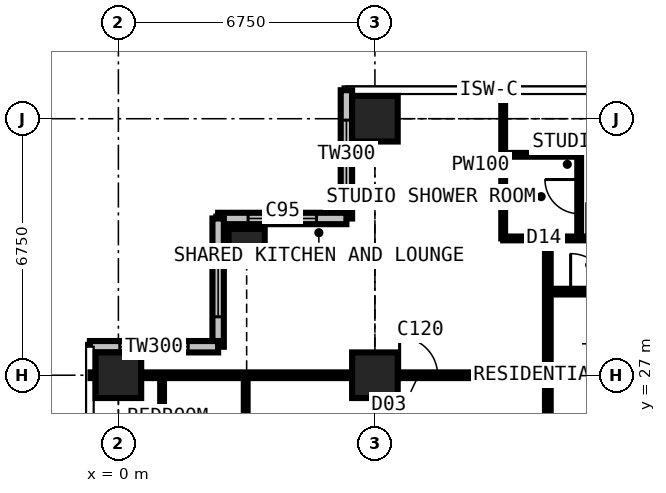
"""IFC4 building model, lengths in metres.
Left out: names, types, materials, properties, quantities, classifications, styles, units other than length and angle.
Written with IfcOpenShell. Run it as: python <this file> out.ifc"""

import sys

from ifc_helpers import new_model, si_unit, direction, frame, frame_2d, origin, origin_2d, place, context, subcontext, project, spatial, rectangle, extrude, element, fill, save


model = new_model("IFC4")
c1 = context("Model", 3, precision=1e-05, world=origin(), true_north=direction((0.0, 1.0)))
c2 = subcontext(c1, "Body", "Model", "MODEL_VIEW")
j1 = project(units=[si_unit("LENGTHUNIT", "METRE"), si_unit("PLANEANGLEUNIT", "RADIAN")], contexts=[c1])
p1 = place(None, origin())
s1 = spatial("IfcSite", under=j1, at=p1, CompositionType="ELEMENT")
p2 = place(p1, origin())
s2 = spatial("IfcBuilding", under=s1, at=p2, CompositionType="ELEMENT")
p3 = place(p2, frame((0.0, 0.0, 178.2)))
s3 = spatial("IfcBuildingStorey", under=s2, at=p3, CompositionType="ELEMENT", Elevation=178.2)
p4 = place(p3, frame((0.0, 27.0, 0.0), z_axis=(0.0, 0.0, 1.0), x_axis=(1.0, 0.0, 0.0)))
e1 = element("IfcColumn", 1, at=p4, inside=s3, PredefinedType="COLUMN", context=c2, shape_type="SweptSolid", body=[
    extrude(rectangle(XDim=1.2, YDim=1.2, at=origin_2d()), origin(), (0.0, 0.0, 1.0), 3.6),
])
p5 = place(p3, frame((3.375, 30.375, 0.0), z_axis=(0.0, 0.0, 1.0), x_axis=(1.0, 0.0, 0.0)))
e2 = element("IfcColumn", 2, at=p5, inside=s3, PredefinedType="COLUMN", context=c2, shape_type="SweptSolid", body=[
    extrude(rectangle(XDim=0.95, YDim=0.95, at=origin_2d()), origin(), (0.0, 0.0, 1.0), 3.6),
])
for number, where, z_axis, x_axis in (
    (3, (6.75, 27.0, 0.0), (0.0, 0.0, 1.0), (1.0, 0.0, 0.0)),
    (4, (6.75, 33.75, 0.0), (0.0, 0.0, 1.0), (1.0, 0.0, 0.0)),
):
    element("IfcColumn", number, at=place(p3, frame(where, z_axis=z_axis, x_axis=x_axis)), inside=s3, PredefinedType="COLUMN", context=c2, shape_type="SweptSolid", body=[
        extrude(rectangle(XDim=1.2, YDim=1.2, at=origin_2d()), origin(), (0.0, 0.0, 1.0), 3.6),
    ])
p6 = place(p3, frame((6.0, 34.5, 0.0), z_axis=(0.0, 0.0, 1.0), x_axis=(0.0, -1.0, 0.0)))
e5 = element("IfcWall", 5, at=p6, inside=s3, PredefinedType="SOLIDWALL", context=c2, shape_type="SweptSolid", body=[
    extrude(rectangle(XDim=3.375, YDim=0.3, at=frame_2d((1.688, 0.0))), origin(), (0.0, 0.0, 1.0), 3.375),
])
p7 = place(p6, frame((0.788, 0.0, 0.6)))
e6 = element("IfcOpeningElement", 6, at=p7, cuts=e5, PredefinedType="OPENING", context=c2, shape_type="SweptSolid", body=[
    extrude(rectangle(XDim=1.8, YDim=2.1, at=frame_2d((0.9, 1.05))), frame((0.0, 0.16, 0.0), z_axis=(0.0, -1.0, 0.0), x_axis=(1.0, 0.0, 0.0)), (0.0, 0.0, 1.0), 0.32),
])
p8 = place(p3, frame((6.0, 31.125, 0.0), z_axis=(0.0, 0.0, 1.0), x_axis=(-1.0, 0.0, 0.0)))
e7 = element("IfcWall", 7, at=p8, inside=s3, PredefinedType="SOLIDWALL", context=c2, shape_type="SweptSolid", body=[
    extrude(rectangle(XDim=3.375, YDim=0.3, at=frame_2d((1.688, 0.0))), origin(), (0.0, 0.0, 1.0), 3.375),
])
p9 = place(p8, frame((0.788, 0.0, 0.6)))
e8 = element("IfcOpeningElement", 8, at=p9, cuts=e7, PredefinedType="OPENING", context=c2, shape_type="SweptSolid", body=[
    extrude(rectangle(XDim=1.8, YDim=2.1, at=frame_2d((0.9, 1.05))), frame((0.0, 0.16, 0.0), z_axis=(0.0, -1.0, 0.0), x_axis=(1.0, 0.0, 0.0)), (0.0, 0.0, 1.0), 0.32),
])
p10 = place(p3, frame((2.625, 31.125, 0.0), z_axis=(0.0, 0.0, 1.0), x_axis=(0.0, -1.0, 0.0)))
e9 = element("IfcWall", 9, at=p10, inside=s3, PredefinedType="SOLIDWALL", context=c2, shape_type="SweptSolid", body=[
    extrude(rectangle(XDim=3.375, YDim=0.3, at=frame_2d((1.688, 0.0))), origin(), (0.0, 0.0, 1.0), 3.375),
])
p11 = place(p10, frame((0.788, 0.0, 0.6)))
e10 = element("IfcOpeningElement", 10, at=p11, cuts=e9, PredefinedType="OPENING", context=c2, shape_type="SweptSolid", body=[
    extrude(rectangle(XDim=1.8, YDim=2.1, at=frame_2d((0.9, 1.05))), frame((0.0, 0.16, 0.0), z_axis=(0.0, -1.0, 0.0), x_axis=(1.0, 0.0, 0.0)), (0.0, 0.0, 1.0), 0.32),
])
p12 = place(p3, frame((2.625, 27.75, 0.0), z_axis=(0.0, 0.0, 1.0), x_axis=(-1.0, 0.0, 0.0)))
e11 = element("IfcWall", 11, at=p12, inside=s3, PredefinedType="SOLIDWALL", context=c2, shape_type="SweptSolid", body=[
    extrude(rectangle(XDim=3.375, YDim=0.3, at=frame_2d((1.688, 0.0))), origin(), (0.0, 0.0, 1.0), 3.375),
])
p13 = place(p12, frame((0.788, 0.0, 0.6)))
e12 = element("IfcOpeningElement", 12, at=p13, cuts=e11, PredefinedType="OPENING", context=c2, shape_type="SweptSolid", body=[
    extrude(rectangle(XDim=1.8, YDim=2.1, at=frame_2d((0.9, 1.05))), frame((0.0, 0.16, 0.0), z_axis=(0.0, -1.0, 0.0), x_axis=(1.0, 0.0, 0.0)), (0.0, 0.0, 1.0), 0.32),
])
p14 = place(p3, frame((-0.734, 27.0, 0.0), z_axis=(0.0, 0.0, 1.0), x_axis=(1.0, 0.0, 0.0)))
e13 = element("IfcWall", 13, at=p14, inside=s3, PredefinedType="PARTITIONING", context=c2, shape_type="SweptSolid", body=[
    extrude(rectangle(XDim=12.034, YDim=0.15, at=frame_2d((6.017, 0.0))), origin(), (0.0, 0.0, 1.0), 2.806),
])
p15 = place(p14, frame((8.134, 0.0, 0.0)))
e14 = element("IfcOpeningElement", 14, at=p15, cuts=e13, PredefinedType="OPENING", context=c2, shape_type="SweptSolid", body=[
    extrude(rectangle(XDim=1.0, YDim=2.2, at=frame_2d((0.5, 1.1))), frame((0.0, 0.085, 0.0), z_axis=(0.0, -1.0, 0.0), x_axis=(1.0, 0.0, 0.0)), (0.0, 0.0, 1.0), 0.17),
])
p16 = place(p3, frame((1.15, 25.0, 0.0), z_axis=(0.0, 0.0, 1.0), x_axis=(0.0, 1.0, 0.0)))
e15 = element("IfcWall", 15, at=p16, inside=s3, PredefinedType="PARTITIONING", context=c2, shape_type="SweptSolid", body=[
    extrude(rectangle(XDim=2.0, YDim=0.1, at=frame_2d((1.0, 0.0))), origin(), (0.0, 0.0, 1.0), 3.375),
])
p17 = place(p3, frame((3.35, 10.125, 0.0), z_axis=(0.0, 0.0, 1.0), x_axis=(0.0, 1.0, 0.0)))
e16 = element("IfcWall", 16, at=p17, inside=s3, PredefinedType="PARTITIONING", context=c2, shape_type="SweptSolid", body=[
    extrude(rectangle(XDim=16.875, YDim=0.1, at=frame_2d((8.438, 0.0))), origin(), (0.0, 0.0, 1.0), 3.375),
])
p18 = place(p17, frame((13.7, 0.0, 0.0)))
e17 = element("IfcOpeningElement", 17, at=p18, cuts=e16, PredefinedType="OPENING", context=c2, shape_type="SweptSolid", body=[
    extrude(rectangle(XDim=0.95, YDim=2.2, at=frame_2d((0.475, 1.1))), frame((0.0, 0.06, 0.0), z_axis=(0.0, -1.0, 0.0), x_axis=(1.0, 0.0, 0.0)), (0.0, 0.0, 1.0), 0.12),
])
p19 = place(p17, frame((4.2, 0.0, 0.0)))
e18 = element("IfcOpeningElement", 18, at=p19, cuts=e16, PredefinedType="OPENING", context=c2, shape_type="SweptSolid", body=[
    extrude(rectangle(XDim=0.95, YDim=2.2, at=frame_2d((0.475, 1.1))), frame((0.0, 0.06, 0.0), z_axis=(0.0, -1.0, 0.0), x_axis=(1.0, 0.0, 0.0)), (0.0, 0.0, 1.0), 0.12),
])
p20 = place(p17, frame((10.95, 0.0, 0.0)))
e19 = element("IfcOpeningElement", 19, at=p20, cuts=e16, PredefinedType="OPENING", context=c2, shape_type="SweptSolid", body=[
    extrude(rectangle(XDim=0.95, YDim=2.2, at=frame_2d((0.475, 1.1))), frame((0.0, 0.06, 0.0), z_axis=(0.0, -1.0, 0.0), x_axis=(1.0, 0.0, 0.0)), (0.0, 0.0, 1.0), 0.12),
])
p21 = place(p3, frame((10.125, 30.6, 0.0), z_axis=(0.0, 0.0, 1.0), x_axis=(0.0, 1.0, 0.0)))
e20 = element("IfcWall", 20, at=p21, inside=s3, PredefinedType="PARTITIONING", context=c2, shape_type="SweptSolid", body=[
    extrude(rectangle(XDim=3.884, YDim=0.1, at=frame_2d((1.942, 0.0))), origin(), (0.0, 0.0, 1.0), 3.375),
])
p22 = place(p3, frame((10.125, 30.6, 0.0), z_axis=(0.0, 0.0, 1.0), x_axis=(1.0, 0.0, 0.0)))
e21 = element("IfcWall", 21, at=p22, inside=s3, PredefinedType="PARTITIONING", context=c2, shape_type="SweptSolid", body=[
    extrude(rectangle(XDim=3.375, YDim=0.1, at=frame_2d((1.688, 0.0))), origin(), (0.0, 0.0, 1.0), 3.375),
])
p23 = place(p22, frame((2.2, 0.0, 0.0)))
e22 = element("IfcOpeningElement", 22, at=p23, cuts=e21, PredefinedType="OPENING", context=c2, shape_type="SweptSolid", body=[
    extrude(rectangle(XDim=0.95, YDim=2.2, at=frame_2d((0.475, 1.1))), frame((0.0, 0.06, 0.0), z_axis=(0.0, -1.0, 0.0), x_axis=(1.0, 0.0, 0.0)), (0.0, 0.0, 1.0), 0.12),
])
p24 = place(p3, frame((10.125, 32.8, 0.0), z_axis=(0.0, 0.0, 1.0), x_axis=(1.0, 0.0, 0.0)))
e23 = element("IfcWall", 23, at=p24, inside=s3, PredefinedType="PARTITIONING", context=c2, shape_type="SweptSolid", body=[
    extrude(rectangle(XDim=2.0, YDim=0.1, at=frame_2d((1.0, 0.0))), origin(), (0.0, 0.0, 1.0), 3.375),
])
p25 = place(p3, frame((11.3, 11.3, 0.0), z_axis=(0.0, 0.0, 1.0), x_axis=(0.0, 1.0, 0.0)))
e24 = element("IfcWall", 24, at=p25, inside=s3, PredefinedType="PARTITIONING", context=c2, shape_type="SweptSolid", body=[
    extrude(rectangle(XDim=19.3, YDim=0.15, at=frame_2d((9.65, 0.0))), origin(), (0.0, 0.0, 1.0), 3.375),
])
p26 = place(p25, frame((13.525, 0.0, 0.0)))
e25 = element("IfcOpeningElement", 25, at=p26, cuts=e24, PredefinedType="OPENING", context=c2, shape_type="SweptSolid", body=[
    extrude(rectangle(XDim=1.0, YDim=2.2, at=frame_2d((0.5, 1.1))), frame((0.0, 0.085, 0.0), z_axis=(0.0, -1.0, 0.0), x_axis=(1.0, 0.0, 0.0)), (0.0, 0.0, 1.0), 0.17),
])
p27 = place(p25, frame((10.438, 0.0, 0.0)))
e26 = element("IfcOpeningElement", 26, at=p27, cuts=e24, PredefinedType="OPENING", context=c2, shape_type="SweptSolid", body=[
    extrude(rectangle(XDim=1.0, YDim=2.2, at=frame_2d((0.5, 1.1))), frame((0.0, 0.085, 0.0), z_axis=(0.0, -1.0, 0.0), x_axis=(1.0, 0.0, 0.0)), (0.0, 0.0, 1.0), 0.17),
])
p28 = place(p3, frame((11.3, 29.2, 0.0), z_axis=(0.0, 0.0, 1.0), x_axis=(1.0, 0.0, 0.0)))
e27 = element("IfcWall", 27, at=p28, inside=s3, PredefinedType="PARTITIONING", context=c2, shape_type="SweptSolid", body=[
    extrude(rectangle(XDim=19.809, YDim=0.15, at=frame_2d((9.904, 0.0))), origin(), (0.0, 0.0, 1.0), 3.375),
])
p29 = place(p28, frame((12.9, 0.0, 0.0)))
e28 = element("IfcOpeningElement", 28, at=p29, cuts=e27, PredefinedType="OPENING", context=c2, shape_type="SweptSolid", body=[
    extrude(rectangle(XDim=1.0, YDim=2.2, at=frame_2d((0.5, 1.1))), frame((0.0, 0.085, 0.0), z_axis=(0.0, -1.0, 0.0), x_axis=(1.0, 0.0, 0.0)), (0.0, 0.0, 1.0), 0.17),
])
p30 = place(p28, frame((5.825, 0.0, 0.0)))
e29 = element("IfcOpeningElement", 29, at=p30, cuts=e27, PredefinedType="OPENING", context=c2, shape_type="SweptSolid", body=[
    extrude(rectangle(XDim=0.95, YDim=2.2, at=frame_2d((0.475, 1.1))), frame((0.0, 0.085, 0.0), z_axis=(0.0, -1.0, 0.0), x_axis=(1.0, 0.0, 0.0)), (0.0, 0.0, 1.0), 0.17),
])
p31 = place(p28, frame((0.6, 0.0, 0.0)))
e30 = element("IfcOpeningElement", 30, at=p31, cuts=e27, PredefinedType="OPENING", context=c2, shape_type="SweptSolid", body=[
    extrude(rectangle(XDim=1.0, YDim=2.2, at=frame_2d((0.5, 1.1))), frame((0.0, 0.085, 0.0), z_axis=(0.0, -1.0, 0.0), x_axis=(1.0, 0.0, 0.0)), (0.0, 0.0, 1.0), 0.17),
])
p32 = place(p3, frame((12.125, 30.6, 0.0), z_axis=(0.0, 0.0, 1.0), x_axis=(0.0, 1.0, 0.0)))
e31 = element("IfcWall", 31, at=p32, inside=s3, PredefinedType="PARTITIONING", context=c2, shape_type="SweptSolid", body=[
    extrude(rectangle(XDim=2.2, YDim=0.1, at=frame_2d((1.1, 0.0))), origin(), (0.0, 0.0, 1.0), 3.375),
])
p33 = place(p32, frame((0.65, 0.0, 0.0)))
e32 = element("IfcOpeningElement", 32, at=p33, cuts=e31, PredefinedType="OPENING", context=c2, shape_type="SweptSolid", body=[
    extrude(rectangle(XDim=0.9, YDim=2.2, at=frame_2d((0.45, 1.1))), frame((0.0, 0.06, 0.0), z_axis=(0.0, -1.0, 0.0), x_axis=(1.0, 0.0, 0.0)), (0.0, 0.0, 1.0), 0.12),
])
p34 = place(p7, origin())
e33 = element("IfcWindow", 33, at=p34, inside=s3, PartitioningType="SINGLE_PANEL", PredefinedType="WINDOW", context=c2, shape_type="SweptSolid", body=[
    extrude(rectangle(XDim=1.8, YDim=2.1, at=frame_2d((0.9, 1.05))), frame((0.0, 0.03, 0.0), z_axis=(0.0, -1.0, 0.0), x_axis=(1.0, 0.0, 0.0)), (0.0, 0.0, 1.0), 0.06),
])
fill(e6, e33)
p35 = place(p9, origin())
e34 = element("IfcWindow", 34, at=p35, inside=s3, PartitioningType="SINGLE_PANEL", PredefinedType="WINDOW", context=c2, shape_type="SweptSolid", body=[
    extrude(rectangle(XDim=1.8, YDim=2.1, at=frame_2d((0.9, 1.05))), frame((0.0, 0.03, 0.0), z_axis=(0.0, -1.0, 0.0), x_axis=(1.0, 0.0, 0.0)), (0.0, 0.0, 1.0), 0.06),
])
fill(e8, e34)
p36 = place(p11, origin())
e35 = element("IfcWindow", 35, at=p36, inside=s3, PartitioningType="SINGLE_PANEL", PredefinedType="WINDOW", context=c2, shape_type="SweptSolid", body=[
    extrude(rectangle(XDim=1.8, YDim=2.1, at=frame_2d((0.9, 1.05))), frame((0.0, 0.03, 0.0), z_axis=(0.0, -1.0, 0.0), x_axis=(1.0, 0.0, 0.0)), (0.0, 0.0, 1.0), 0.06),
])
fill(e10, e35)
p37 = place(p13, origin())
e36 = element("IfcWindow", 36, at=p37, inside=s3, PartitioningType="SINGLE_PANEL", PredefinedType="WINDOW", context=c2, shape_type="SweptSolid", body=[
    extrude(rectangle(XDim=1.8, YDim=2.1, at=frame_2d((0.9, 1.05))), frame((0.0, 0.03, 0.0), z_axis=(0.0, -1.0, 0.0), x_axis=(1.0, 0.0, 0.0)), (0.0, 0.0, 1.0), 0.06),
])
fill(e12, e36)
p38 = place(p33, origin())
e37 = element("IfcDoor", 37, at=p38, inside=s3, OperationType="SINGLE_SWING_RIGHT", PredefinedType="DOOR", context=c2, shape_type="SweptSolid", body=[
    extrude(rectangle(XDim=0.9, YDim=2.2, at=frame_2d((0.45, 1.1))), frame((0.0, 0.025, 0.0), z_axis=(0.0, -1.0, 0.0), x_axis=(1.0, 0.0, 0.0)), (0.0, 0.0, 1.0), 0.05),
])
fill(e32, e37)
p39 = place(p31, origin())
e38 = element("IfcDoor", 38, at=p39, inside=s3, OperationType="SINGLE_SWING_LEFT", PredefinedType="DOOR", context=c2, shape_type="SweptSolid", body=[
    extrude(rectangle(XDim=1.0, YDim=2.2, at=frame_2d((0.5, 1.1))), frame((0.0, 0.025, 0.0), z_axis=(0.0, -1.0, 0.0), x_axis=(1.0, 0.0, 0.0)), (0.0, 0.0, 1.0), 0.05),
])
fill(e30, e38)
p40 = place(p15, origin())
e39 = element("IfcDoor", 39, at=p40, inside=s3, OperationType="SINGLE_SWING_LEFT", PredefinedType="DOOR", context=c2, shape_type="SweptSolid", body=[
    extrude(rectangle(XDim=1.0, YDim=2.2, at=frame_2d((0.5, 1.1))), frame((0.0, 0.025, 0.0), z_axis=(0.0, -1.0, 0.0), x_axis=(1.0, 0.0, 0.0)), (0.0, 0.0, 1.0), 0.05),
])
fill(e14, e39)
save(model, sys.argv[1])
